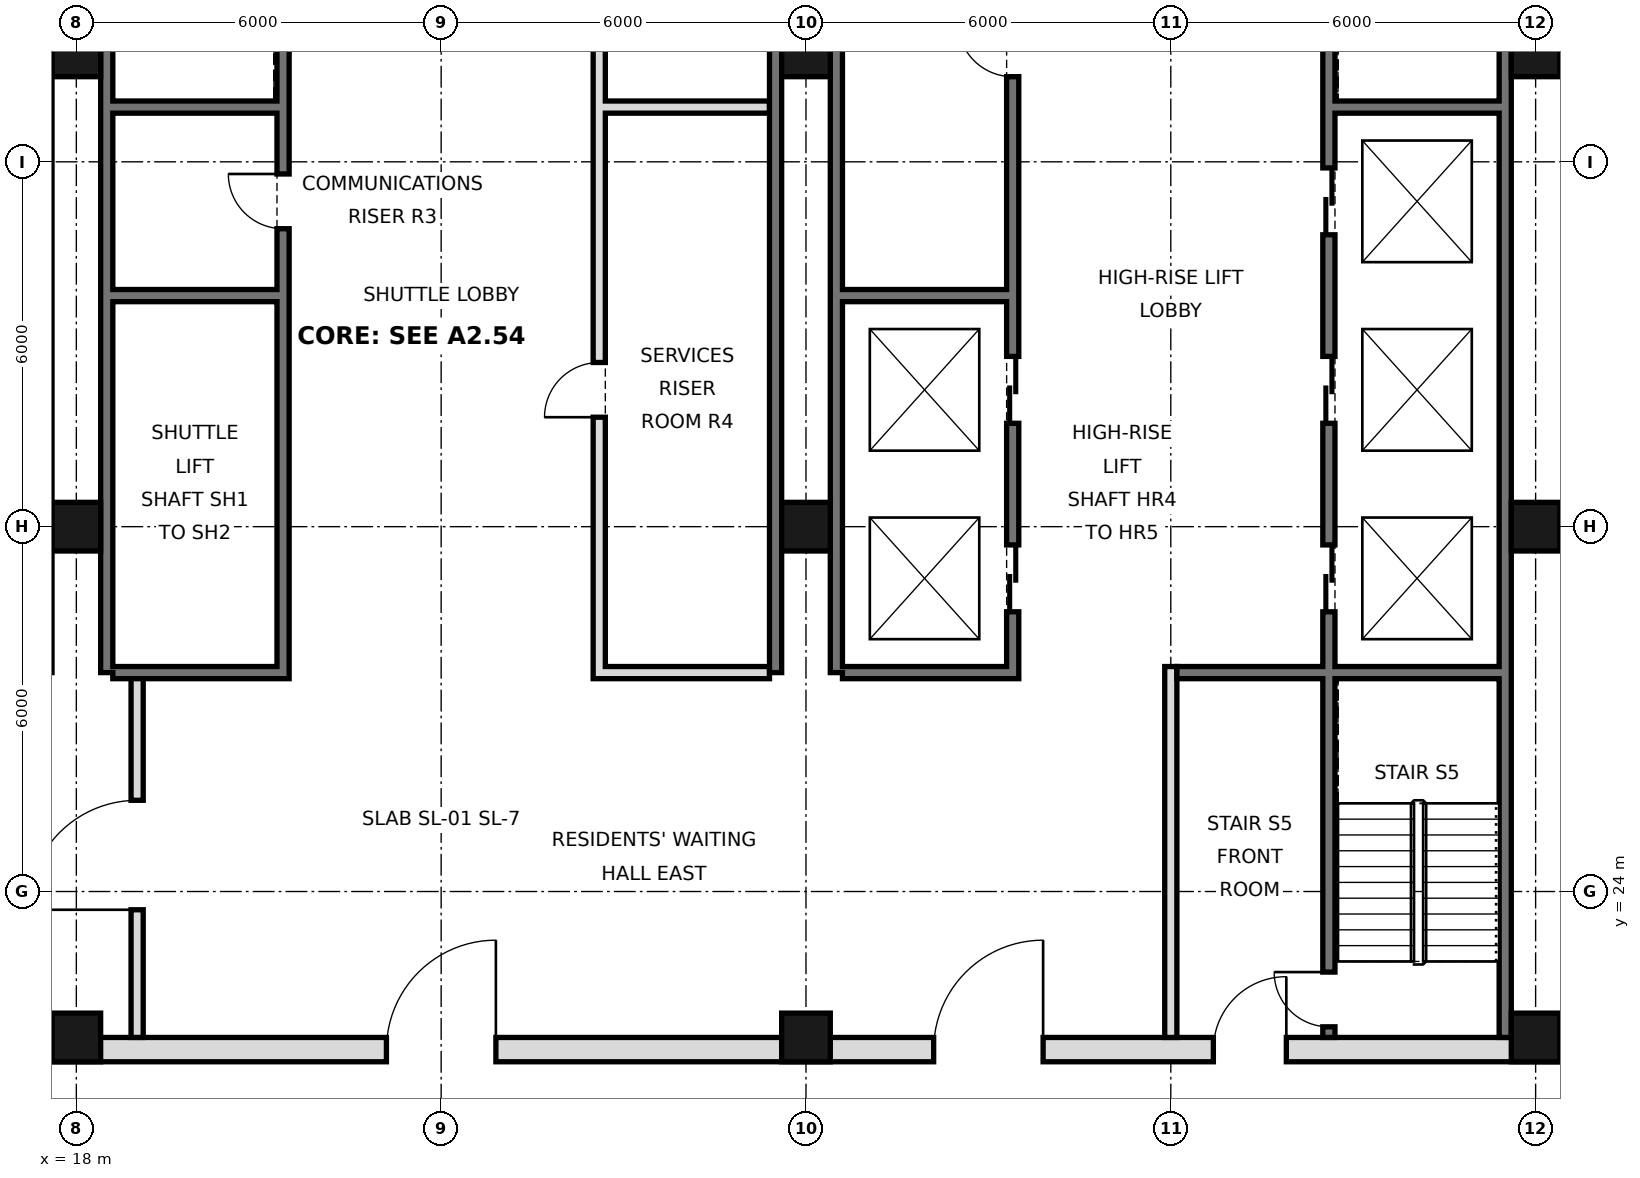
"""IFC4 building model, lengths in metres.
Left out: names, types, materials, properties, quantities, classifications, styles, units other than length and angle.
Written with IfcOpenShell. Run it as: python <this file> out.ifc"""

import sys

from ifc_helpers import new_model, si_unit, direction, frame, frame_2d, origin, origin_2d, place, context, subcontext, project, spatial, rectangle, hollow_rectangle, extrude, element, fill, save


model = new_model("IFC4")
c1 = context("Model", 3, precision=1e-05, world=origin(), true_north=direction((0.0, 1.0)))
c2 = subcontext(c1, "Body", "Model", "MODEL_VIEW")
j1 = project(units=[si_unit("LENGTHUNIT", "METRE"), si_unit("PLANEANGLEUNIT", "RADIAN")], contexts=[c1])
p1 = place(None, origin())
s1 = spatial("IfcSite", under=j1, at=p1, CompositionType="ELEMENT")
p2 = place(p1, origin())
s2 = spatial("IfcBuilding", under=s1, at=p2, CompositionType="ELEMENT")
p3 = place(p2, frame((0.0, 0.0, 215.4)))
s3 = spatial("IfcBuildingStorey", under=s2, at=p3, CompositionType="ELEMENT", Elevation=215.4)
for number, where, z_axis, x_axis in (
    (1, (18.0, 21.6, 0.0), (0.0, 0.0, 1.0), (1.0, 0.0, 0.0)),
    (2, (18.0, 30.0, 0.0), (0.0, 0.0, 1.0), (1.0, 0.0, 0.0)),
    (3, (18.0, 37.8, 0.0), (0.0, 0.0, 1.0), (1.0, 0.0, 0.0)),
    (4, (30.0, 21.6, 0.0), (0.0, 0.0, 1.0), (1.0, 0.0, 0.0)),
    (5, (30.0, 30.0, 0.0), (0.0, 0.0, 1.0), (1.0, 0.0, 0.0)),
    (6, (30.0, 37.8, 0.0), (0.0, 0.0, 1.0), (1.0, 0.0, 0.0)),
    (7, (42.0, 21.6, 0.0), (0.0, 0.0, 1.0), (1.0, 0.0, 0.0)),
    (8, (42.0, 30.0, 0.0), (0.0, 0.0, 1.0), (1.0, 0.0, 0.0)),
    (9, (42.0, 37.8, 0.0), (0.0, 0.0, 1.0), (1.0, 0.0, 0.0)),
):
    element("IfcColumn", number, at=place(p3, frame(where, z_axis=z_axis, x_axis=x_axis)), inside=s3, PredefinedType="COLUMN", context=c2, shape_type="SweptSolid", body=[
        extrude(hollow_rectangle(XDim=0.8, YDim=0.8, WallThickness=0.04, at=origin_2d()), origin(), (0.0, 0.0, 1.0), 3.6),
    ])
p4 = place(p3, frame((41.5, 21.6, 0.0), z_axis=(0.0, 0.0, 1.0), x_axis=(0.0, 1.0, 0.0)))
e10 = element("IfcWall", 10, at=p4, inside=s3, PredefinedType="SOLIDWALL", context=c2, shape_type="SweptSolid", body=[
    extrude(rectangle(XDim=23.5, YDim=0.2, at=frame_2d((11.75, 0.0))), origin(), (0.0, 0.0, 1.0), 3.42),
])
for number, where, z_axis, x_axis in (
    (11, (18.5, 27.6, 0.0), (0.0, 0.0, 1.0), (0.0, 1.0, 0.0)),
    (12, (29.5, 27.6, 0.0), (0.0, 0.0, 1.0), (0.0, 1.0, 0.0)),
    (13, (30.5, 27.6, 0.0), (0.0, 0.0, 1.0), (0.0, 1.0, 0.0)),
):
    element("IfcWall", number, at=place(p3, frame(where, z_axis=z_axis, x_axis=x_axis)), inside=s3, PredefinedType="SOLIDWALL", context=c2, shape_type="SweptSolid", body=[
        extrude(rectangle(XDim=17.5, YDim=0.2, at=frame_2d((8.75, 0.0))), origin(), (0.0, 0.0, 1.0), 3.42),
    ])
p5 = place(p3, frame((5.6, 21.4, 0.0), z_axis=(0.0, 0.0, 1.0), x_axis=(1.0, 0.0, 0.0)))
e14 = element("IfcWall", 14, at=p5, inside=s3, PredefinedType="SOLIDWALL", context=c2, shape_type="SweptSolid", body=[
    extrude(rectangle(XDim=36.8, YDim=0.4, at=frame_2d((18.4, 0.0))), origin(), (0.0, 0.0, 1.0), 3.42),
])
p6 = place(p5, frame((8.5, 0.0, 0.0)))
e15 = element("IfcOpeningElement", 15, at=p6, cuts=e14, PredefinedType="OPENING", context=c2, shape_type="SweptSolid", body=[
    extrude(rectangle(XDim=1.8, YDim=2.1, at=frame_2d((0.9, 1.05))), frame((0.0, 0.21, 0.0), z_axis=(0.0, -1.0, 0.0), x_axis=(1.0, 0.0, 0.0)), (0.0, 0.0, 1.0), 0.42),
])
p7 = place(p5, frame((17.5, 0.0, 0.0)))
e16 = element("IfcOpeningElement", 16, at=p7, cuts=e14, PredefinedType="OPENING", context=c2, shape_type="SweptSolid", body=[
    extrude(rectangle(XDim=1.8, YDim=2.1, at=frame_2d((0.9, 1.05))), frame((0.0, 0.21, 0.0), z_axis=(0.0, -1.0, 0.0), x_axis=(1.0, 0.0, 0.0)), (0.0, 0.0, 1.0), 0.42),
])
p8 = place(p5, frame((26.5, 0.0, 0.0)))
e17 = element("IfcOpeningElement", 17, at=p8, cuts=e14, PredefinedType="OPENING", context=c2, shape_type="SweptSolid", body=[
    extrude(rectangle(XDim=1.8, YDim=2.1, at=frame_2d((0.9, 1.05))), frame((0.0, 0.21, 0.0), z_axis=(0.0, -1.0, 0.0), x_axis=(1.0, 0.0, 0.0)), (0.0, 0.0, 1.0), 0.42),
])
p9 = place(p5, frame((4.5, 0.0, 0.0)))
e18 = element("IfcOpeningElement", 18, at=p9, cuts=e14, PredefinedType="OPENING", context=c2, shape_type="SweptSolid", body=[
    extrude(rectangle(XDim=1.2, YDim=2.1, at=frame_2d((0.6, 1.05))), frame((0.0, 0.21, 0.0), z_axis=(0.0, -1.0, 0.0), x_axis=(1.0, 0.0, 0.0)), (0.0, 0.0, 1.0), 0.42),
])
p10 = place(p5, frame((31.1, 0.0, 0.0)))
e19 = element("IfcOpeningElement", 19, at=p10, cuts=e14, PredefinedType="OPENING", context=c2, shape_type="SweptSolid", body=[
    extrude(rectangle(XDim=1.2, YDim=2.1, at=frame_2d((0.6, 1.05))), frame((0.0, 0.21, 0.0), z_axis=(0.0, -1.0, 0.0), x_axis=(1.0, 0.0, 0.0)), (0.0, 0.0, 1.0), 0.42),
])
p11 = place(p3, frame((19.0, 21.6, 0.0), z_axis=(0.0, 0.0, 1.0), x_axis=(0.0, 1.0, 0.0)))
e20 = element("IfcWall", 20, at=p11, inside=s3, PredefinedType="PARTITIONING", context=c2, shape_type="SweptSolid", body=[
    extrude(rectangle(XDim=6.0, YDim=0.2, at=frame_2d((3.0, 0.0))), origin(), (0.0, 0.0, 1.0), 3.42),
])
p12 = place(p11, frame((2.1, 0.0, 0.0)))
e21 = element("IfcOpeningElement", 21, at=p12, cuts=e20, PredefinedType="OPENING", context=c2, shape_type="SweptSolid", body=[
    extrude(rectangle(XDim=1.8, YDim=2.1, at=frame_2d((0.9, 1.05))), frame((0.0, 0.11, 0.0), z_axis=(0.0, -1.0, 0.0), x_axis=(1.0, 0.0, 0.0)), (0.0, 0.0, 1.0), 0.22),
])
p13 = place(p3, frame((21.4, 27.5, 0.0), z_axis=(0.0, 0.0, 1.0), x_axis=(0.0, 1.0, 0.0)))
e22 = element("IfcWall", 22, at=p13, inside=s3, PredefinedType="SOLIDWALL", context=c2, shape_type="SweptSolid", body=[
    extrude(rectangle(XDim=17.5, YDim=0.2, at=frame_2d((8.75, 0.0))), origin(), (0.0, 0.0, 1.0), 3.42),
])
p14 = place(p13, frame((16.2, 0.0, 0.0)))
e23 = element("IfcOpeningElement", 23, at=p14, cuts=e22, PredefinedType="OPENING", context=c2, shape_type="SweptSolid", body=[
    extrude(rectangle(XDim=1.0, YDim=2.1, at=frame_2d((0.5, 1.05))), frame((0.0, 0.11, 0.0), z_axis=(0.0, -1.0, 0.0), x_axis=(1.0, 0.0, 0.0)), (0.0, 0.0, 1.0), 0.22),
])
p15 = place(p13, frame((7.4, 0.0, 0.0)))
e24 = element("IfcOpeningElement", 24, at=p15, cuts=e22, PredefinedType="OPENING", context=c2, shape_type="SweptSolid", body=[
    extrude(rectangle(XDim=0.9, YDim=2.1, at=frame_2d((0.45, 1.05))), frame((0.0, 0.11, 0.0), z_axis=(0.0, -1.0, 0.0), x_axis=(1.0, 0.0, 0.0)), (0.0, 0.0, 1.0), 0.22),
])
p16 = place(p3, frame((26.6, 27.5, 0.0), z_axis=(0.0, 0.0, 1.0), x_axis=(0.0, 1.0, 0.0)))
e25 = element("IfcWall", 25, at=p16, inside=s3, PredefinedType="SOLIDWALL", context=c2, shape_type="SweptSolid", body=[
    extrude(rectangle(XDim=17.5, YDim=0.2, at=frame_2d((8.75, 0.0))), origin(), (0.0, 0.0, 1.0), 3.42),
])
p17 = place(p16, frame((4.3, 0.0, 0.0)))
e26 = element("IfcOpeningElement", 26, at=p17, cuts=e25, PredefinedType="OPENING", context=c2, shape_type="SweptSolid", body=[
    extrude(rectangle(XDim=0.9, YDim=2.1, at=frame_2d((0.45, 1.05))), frame((0.0, 0.11, 0.0), z_axis=(0.0, -1.0, 0.0), x_axis=(1.0, 0.0, 0.0)), (0.0, 0.0, 1.0), 0.22),
])
p18 = place(p16, frame((10.35, 0.0, 0.0)))
e27 = element("IfcOpeningElement", 27, at=p18, cuts=e25, PredefinedType="OPENING", context=c2, shape_type="SweptSolid", body=[
    extrude(rectangle(XDim=1.0, YDim=2.1, at=frame_2d((0.5, 1.05))), frame((0.0, 0.11, 0.0), z_axis=(0.0, -1.0, 0.0), x_axis=(1.0, 0.0, 0.0)), (0.0, 0.0, 1.0), 0.22),
])
p19 = place(p3, frame((33.4, 27.5, 0.0), z_axis=(0.0, 0.0, 1.0), x_axis=(0.0, 1.0, 0.0)))
e28 = element("IfcWall", 28, at=p19, inside=s3, PredefinedType="SOLIDWALL", context=c2, shape_type="SweptSolid", body=[
    extrude(rectangle(XDim=17.5, YDim=0.2, at=frame_2d((8.75, 0.0))), origin(), (0.0, 0.0, 1.0), 3.42),
])
p20 = place(p19, frame((1.1, 0.0, 0.0)))
e29 = element("IfcOpeningElement", 29, at=p20, cuts=e28, PredefinedType="OPENING", context=c2, shape_type="SweptSolid", body=[
    extrude(rectangle(XDim=1.1, YDim=2.1, at=frame_2d((0.55, 1.05))), frame((0.0, 0.11, 0.0), z_axis=(0.0, -1.0, 0.0), x_axis=(1.0, 0.0, 0.0)), (0.0, 0.0, 1.0), 0.22),
])
p21 = place(p19, frame((4.2, 0.0, 0.0)))
e30 = element("IfcOpeningElement", 30, at=p21, cuts=e28, PredefinedType="OPENING", context=c2, shape_type="SweptSolid", body=[
    extrude(rectangle(XDim=1.1, YDim=2.1, at=frame_2d((0.55, 1.05))), frame((0.0, 0.11, 0.0), z_axis=(0.0, -1.0, 0.0), x_axis=(1.0, 0.0, 0.0)), (0.0, 0.0, 1.0), 0.22),
])
p22 = place(p19, frame((15.4, 0.0, 0.0)))
e31 = element("IfcOpeningElement", 31, at=p22, cuts=e28, PredefinedType="OPENING", context=c2, shape_type="SweptSolid", body=[
    extrude(rectangle(XDim=1.1, YDim=2.1, at=frame_2d((0.55, 1.05))), frame((0.0, 0.11, 0.0), z_axis=(0.0, -1.0, 0.0), x_axis=(1.0, 0.0, 0.0)), (0.0, 0.0, 1.0), 0.22),
])
p23 = place(p19, frame((9.9, 0.0, 0.0)))
e32 = element("IfcOpeningElement", 32, at=p23, cuts=e28, PredefinedType="OPENING", context=c2, shape_type="SweptSolid", body=[
    extrude(rectangle(XDim=0.9, YDim=2.1, at=frame_2d((0.45, 1.05))), frame((0.0, 0.11, 0.0), z_axis=(0.0, -1.0, 0.0), x_axis=(1.0, 0.0, 0.0)), (0.0, 0.0, 1.0), 0.22),
])
p24 = place(p3, frame((36.0, 21.6, 0.0), z_axis=(0.0, 0.0, 1.0), x_axis=(0.0, 1.0, 0.0)))
e33 = element("IfcWall", 33, at=p24, inside=s3, PredefinedType="PARTITIONING", context=c2, shape_type="SweptSolid", body=[
    extrude(rectangle(XDim=6.1, YDim=0.2, at=frame_2d((3.05, 0.0))), origin(), (0.0, 0.0, 1.0), 3.42),
])
p25 = place(p3, frame((38.6, 21.6, 0.0), z_axis=(0.0, 0.0, 1.0), x_axis=(0.0, 1.0, 0.0)))
e34 = element("IfcWall", 34, at=p25, inside=s3, PredefinedType="SOLIDWALL", context=c2, shape_type="SweptSolid", body=[
    extrude(rectangle(XDim=23.4, YDim=0.2, at=frame_2d((11.7, 0.0))), origin(), (0.0, 0.0, 1.0), 3.42),
])
p26 = place(p25, frame((7.0, 0.0, 0.0)))
e35 = element("IfcOpeningElement", 35, at=p26, cuts=e34, PredefinedType="OPENING", context=c2, shape_type="SweptSolid", body=[
    extrude(rectangle(XDim=1.1, YDim=2.1, at=frame_2d((0.55, 1.05))), frame((0.0, 0.11, 0.0), z_axis=(0.0, -1.0, 0.0), x_axis=(1.0, 0.0, 0.0)), (0.0, 0.0, 1.0), 0.22),
])
p27 = place(p25, frame((10.1, 0.0, 0.0)))
e36 = element("IfcOpeningElement", 36, at=p27, cuts=e34, PredefinedType="OPENING", context=c2, shape_type="SweptSolid", body=[
    extrude(rectangle(XDim=1.1, YDim=2.1, at=frame_2d((0.55, 1.05))), frame((0.0, 0.11, 0.0), z_axis=(0.0, -1.0, 0.0), x_axis=(1.0, 0.0, 0.0)), (0.0, 0.0, 1.0), 0.22),
])
p28 = place(p25, frame((13.2, 0.0, 0.0)))
e37 = element("IfcOpeningElement", 37, at=p28, cuts=e34, PredefinedType="OPENING", context=c2, shape_type="SweptSolid", body=[
    extrude(rectangle(XDim=1.1, YDim=2.1, at=frame_2d((0.55, 1.05))), frame((0.0, 0.11, 0.0), z_axis=(0.0, -1.0, 0.0), x_axis=(1.0, 0.0, 0.0)), (0.0, 0.0, 1.0), 0.22),
])
p29 = place(p25, frame((22.1, 0.0, 0.0)))
e38 = element("IfcOpeningElement", 38, at=p29, cuts=e34, PredefinedType="OPENING", context=c2, shape_type="SweptSolid", body=[
    extrude(rectangle(XDim=1.0, YDim=2.1, at=frame_2d((0.5, 1.05))), frame((0.0, 0.11, 0.0), z_axis=(0.0, -1.0, 0.0), x_axis=(1.0, 0.0, 0.0)), (0.0, 0.0, 1.0), 0.22),
])
p30 = place(p25, frame((0.175, 0.0, 0.0)))
e39 = element("IfcOpeningElement", 39, at=p30, cuts=e34, PredefinedType="OPENING", context=c2, shape_type="SweptSolid", body=[
    extrude(rectangle(XDim=0.9, YDim=2.1, at=frame_2d((0.45, 1.05))), frame((0.0, 0.11, 0.0), z_axis=(0.0, -1.0, 0.0), x_axis=(1.0, 0.0, 0.0)), (0.0, 0.0, 1.0), 0.22),
])
for number, where, z_axis, x_axis in (
    (40, (18.6, 27.6, 0.0), (0.0, 0.0, 1.0), (1.0, 0.0, 0.0)),
    (41, (26.7, 27.6, 0.0), (0.0, 0.0, 1.0), (1.0, 0.0, 0.0)),
    (42, (30.6, 27.6, 0.0), (0.0, 0.0, 1.0), (1.0, 0.0, 0.0)),
):
    element("IfcWall", number, at=place(p3, frame(where, z_axis=z_axis, x_axis=x_axis)), inside=s3, PredefinedType="SOLIDWALL", context=c2, shape_type="SweptSolid", body=[
        extrude(rectangle(XDim=2.7, YDim=0.2, at=frame_2d((1.35, 0.0))), origin(), (0.0, 0.0, 1.0), 3.42),
    ])
p31 = place(p3, frame((36.1, 27.6, 0.0), z_axis=(0.0, 0.0, 1.0), x_axis=(1.0, 0.0, 0.0)))
e43 = element("IfcWall", 43, at=p31, inside=s3, PredefinedType="SOLIDWALL", context=c2, shape_type="SweptSolid", body=[
    extrude(rectangle(XDim=5.3, YDim=0.2, at=frame_2d((2.65, 0.0))), origin(), (0.0, 0.0, 1.0), 3.42),
])
for number, where, z_axis, x_axis in (
    (44, (18.6, 33.8, 0.0), (0.0, 0.0, 1.0), (1.0, 0.0, 0.0)),
    (45, (30.6, 33.8, 0.0), (0.0, 0.0, 1.0), (1.0, 0.0, 0.0)),
    (46, (18.6, 36.9, 0.0), (0.0, 0.0, 1.0), (1.0, 0.0, 0.0)),
    (47, (26.7, 36.9, 0.0), (0.0, 0.0, 1.0), (1.0, 0.0, 0.0)),
    (48, (38.7, 36.9, 0.0), (0.0, 0.0, 1.0), (1.0, 0.0, 0.0)),
):
    element("IfcWall", number, at=place(p3, frame(where, z_axis=z_axis, x_axis=x_axis)), inside=s3, PredefinedType="SOLIDWALL", context=c2, shape_type="SweptSolid", body=[
        extrude(rectangle(XDim=2.7, YDim=0.2, at=frame_2d((1.35, 0.0))), origin(), (0.0, 0.0, 1.0), 3.42),
    ])
p32 = place(p12, origin())
e49 = element("IfcDoor", 49, at=p32, inside=s3, OperationType="SINGLE_SWING_LEFT", PredefinedType="DOOR", context=c2, shape_type="SweptSolid", body=[
    extrude(rectangle(XDim=1.8, YDim=2.1, at=frame_2d((0.9, 1.05))), frame((0.0, 0.025, 0.0), z_axis=(0.0, -1.0, 0.0), x_axis=(1.0, 0.0, 0.0)), (0.0, 0.0, 1.0), 0.05),
])
fill(e21, e49)
p33 = place(p7, frame((1.8, 0.0, 0.0), z_axis=(0.0, 0.0, 1.0), x_axis=(-1.0, 0.0, 0.0)))
e50 = element("IfcDoor", 50, at=p33, inside=s3, OperationType="SINGLE_SWING_LEFT", PredefinedType="DOOR", context=c2, shape_type="SweptSolid", body=[
    extrude(rectangle(XDim=1.8, YDim=2.1, at=frame_2d((0.9, 1.05))), frame((0.0, 0.025, 0.0), z_axis=(0.0, -1.0, 0.0), x_axis=(1.0, 0.0, 0.0)), (0.0, 0.0, 1.0), 0.05),
])
fill(e16, e50)
p34 = place(p8, frame((1.8, 0.0, 0.0), z_axis=(0.0, 0.0, 1.0), x_axis=(-1.0, 0.0, 0.0)))
e51 = element("IfcDoor", 51, at=p34, inside=s3, OperationType="SINGLE_SWING_LEFT", PredefinedType="DOOR", context=c2, shape_type="SweptSolid", body=[
    extrude(rectangle(XDim=1.8, YDim=2.1, at=frame_2d((0.9, 1.05))), frame((0.0, 0.025, 0.0), z_axis=(0.0, -1.0, 0.0), x_axis=(1.0, 0.0, 0.0)), (0.0, 0.0, 1.0), 0.05),
])
fill(e17, e51)
p35 = place(p10, frame((1.2, 0.0, 0.0), z_axis=(0.0, 0.0, 1.0), x_axis=(-1.0, 0.0, 0.0)))
e52 = element("IfcDoor", 52, at=p35, inside=s3, OperationType="SINGLE_SWING_LEFT", PredefinedType="DOOR", context=c2, shape_type="SweptSolid", body=[
    extrude(rectangle(XDim=1.2, YDim=2.1, at=frame_2d((0.6, 1.05))), frame((0.0, 0.025, 0.0), z_axis=(0.0, -1.0, 0.0), x_axis=(1.0, 0.0, 0.0)), (0.0, 0.0, 1.0), 0.05),
])
fill(e19, e52)
p36 = place(p26, origin())
e53 = element("IfcDoor", 53, at=p36, inside=s3, OperationType="DOUBLE_DOOR_SLIDING", PredefinedType="DOOR", context=c2, shape_type="SweptSolid", body=[
    extrude(rectangle(XDim=1.1, YDim=2.1, at=frame_2d((0.55, 1.05))), frame((0.0, 0.025, 0.0), z_axis=(0.0, -1.0, 0.0), x_axis=(1.0, 0.0, 0.0)), (0.0, 0.0, 1.0), 0.05),
])
fill(e35, e53)
p37 = place(p27, origin())
e54 = element("IfcDoor", 54, at=p37, inside=s3, OperationType="DOUBLE_DOOR_SLIDING", PredefinedType="DOOR", context=c2, shape_type="SweptSolid", body=[
    extrude(rectangle(XDim=1.1, YDim=2.1, at=frame_2d((0.55, 1.05))), frame((0.0, 0.025, 0.0), z_axis=(0.0, -1.0, 0.0), x_axis=(1.0, 0.0, 0.0)), (0.0, 0.0, 1.0), 0.05),
])
fill(e36, e54)
p38 = place(p28, origin())
e55 = element("IfcDoor", 55, at=p38, inside=s3, OperationType="DOUBLE_DOOR_SLIDING", PredefinedType="DOOR", context=c2, shape_type="SweptSolid", body=[
    extrude(rectangle(XDim=1.1, YDim=2.1, at=frame_2d((0.55, 1.05))), frame((0.0, 0.025, 0.0), z_axis=(0.0, -1.0, 0.0), x_axis=(1.0, 0.0, 0.0)), (0.0, 0.0, 1.0), 0.05),
])
fill(e37, e55)
p39 = place(p20, origin())
e56 = element("IfcDoor", 56, at=p39, inside=s3, OperationType="DOUBLE_DOOR_SLIDING", PredefinedType="DOOR", context=c2, shape_type="SweptSolid", body=[
    extrude(rectangle(XDim=1.1, YDim=2.1, at=frame_2d((0.55, 1.05))), frame((0.0, 0.025, 0.0), z_axis=(0.0, -1.0, 0.0), x_axis=(1.0, 0.0, 0.0)), (0.0, 0.0, 1.0), 0.05),
])
fill(e29, e56)
p40 = place(p21, origin())
e57 = element("IfcDoor", 57, at=p40, inside=s3, OperationType="DOUBLE_DOOR_SLIDING", PredefinedType="DOOR", context=c2, shape_type="SweptSolid", body=[
    extrude(rectangle(XDim=1.1, YDim=2.1, at=frame_2d((0.55, 1.05))), frame((0.0, 0.025, 0.0), z_axis=(0.0, -1.0, 0.0), x_axis=(1.0, 0.0, 0.0)), (0.0, 0.0, 1.0), 0.05),
])
fill(e30, e57)
p41 = place(p30, frame((0.9, 0.0, 0.0), z_axis=(0.0, 0.0, 1.0), x_axis=(-1.0, 0.0, 0.0)))
e58 = element("IfcDoor", 58, at=p41, inside=s3, OperationType="SINGLE_SWING_LEFT", PredefinedType="DOOR", context=c2, shape_type="SweptSolid", body=[
    extrude(rectangle(XDim=0.9, YDim=2.1, at=frame_2d((0.45, 1.05))), frame((0.0, 0.025, 0.0), z_axis=(0.0, -1.0, 0.0), x_axis=(1.0, 0.0, 0.0)), (0.0, 0.0, 1.0), 0.05),
])
fill(e39, e58)
p42 = place(p23, frame((0.9, 0.0, 0.0), z_axis=(0.0, 0.0, 1.0), x_axis=(-1.0, 0.0, 0.0)))
e59 = element("IfcDoor", 59, at=p42, inside=s3, OperationType="SINGLE_SWING_LEFT", PredefinedType="DOOR", context=c2, shape_type="SweptSolid", body=[
    extrude(rectangle(XDim=0.9, YDim=2.1, at=frame_2d((0.45, 1.05))), frame((0.0, 0.025, 0.0), z_axis=(0.0, -1.0, 0.0), x_axis=(1.0, 0.0, 0.0)), (0.0, 0.0, 1.0), 0.05),
])
fill(e32, e59)
p43 = place(p15, frame((0.9, 0.0, 0.0), z_axis=(0.0, 0.0, 1.0), x_axis=(-1.0, 0.0, 0.0)))
e60 = element("IfcDoor", 60, at=p43, inside=s3, OperationType="SINGLE_SWING_LEFT", PredefinedType="DOOR", context=c2, shape_type="SweptSolid", body=[
    extrude(rectangle(XDim=0.9, YDim=2.1, at=frame_2d((0.45, 1.05))), frame((0.0, 0.025, 0.0), z_axis=(0.0, -1.0, 0.0), x_axis=(1.0, 0.0, 0.0)), (0.0, 0.0, 1.0), 0.05),
])
fill(e24, e60)
p44 = place(p17, origin())
e61 = element("IfcDoor", 61, at=p44, inside=s3, OperationType="SINGLE_SWING_LEFT", PredefinedType="DOOR", context=c2, shape_type="SweptSolid", body=[
    extrude(rectangle(XDim=0.9, YDim=2.1, at=frame_2d((0.45, 1.05))), frame((0.0, 0.025, 0.0), z_axis=(0.0, -1.0, 0.0), x_axis=(1.0, 0.0, 0.0)), (0.0, 0.0, 1.0), 0.05),
])
fill(e26, e61)
save(model, sys.argv[1])
